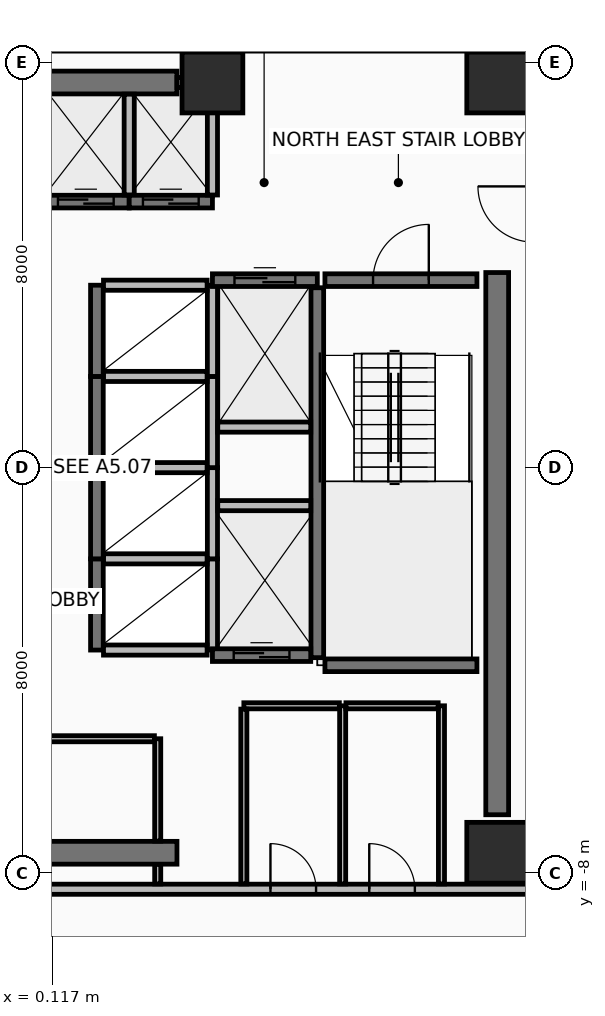
"""IFC4 building model, lengths in metres.
Left out: names, types, materials, properties, quantities, classifications, styles, units other than length and angle.
Written with IfcOpenShell. Run it as: python <this file> out.ifc"""

import sys

from ifc_helpers import new_model, si_unit, direction, frame, frame_2d, origin, origin_2d, place, context, subcontext, project, spatial, rectangle, extrude, element, fill, save


model = new_model("IFC4")
c1 = context("Model", 3, precision=1e-05, world=origin(), true_north=direction((0.0, 1.0)))
c2 = subcontext(c1, "Body", "Model", "MODEL_VIEW")
j1 = project(units=[si_unit("LENGTHUNIT", "METRE"), si_unit("PLANEANGLEUNIT", "RADIAN")], contexts=[c1])
p1 = place(None, origin())
s1 = spatial("IfcSite", under=j1, at=p1, CompositionType="ELEMENT")
p2 = place(p1, origin())
s2 = spatial("IfcBuilding", under=s1, at=p2, CompositionType="ELEMENT")
p3 = place(p2, frame((0.0, 0.0, 116.05)))
s3 = spatial("IfcBuildingStorey", under=s2, at=p3, CompositionType="ELEMENT", Elevation=116.05)
for number, where, z_axis, x_axis in (
    (1, (8.9, -7.6, 0.0), (0.0, 0.0, 1.0), (1.0, 0.0, 0.0)),
    (2, (8.9, 7.6, 0.0), (0.0, 0.0, 1.0), (1.0, 0.0, 0.0)),
    (3, (3.28, 7.6, 0.0), (0.0, 0.0, 1.0), (1.0, 0.0, 0.0)),
):
    element("IfcColumn", number, at=place(p3, frame(where, z_axis=z_axis, x_axis=x_axis)), inside=s3, PredefinedType="COLUMN", context=c2, shape_type="SweptSolid", body=[
        extrude(rectangle(XDim=1.2, YDim=1.2, at=origin_2d()), origin(), (0.0, 0.0, 1.0), 3.6),
    ])
for number, where, z_axis, x_axis in (
    (4, (-2.8, -7.6, 0.0), (0.0, 0.0, 1.0), (1.0, 0.0, 0.0)),
    (5, (-2.8, 7.6, 0.0), (0.0, 0.0, 1.0), (1.0, 0.0, 0.0)),
):
    element("IfcWall", number, at=place(p3, frame(where, z_axis=z_axis, x_axis=x_axis)), inside=s3, PredefinedType="SHEAR", context=c2, shape_type="SweptSolid", body=[
        extrude(rectangle(XDim=5.38, YDim=0.45, at=frame_2d((2.69, 0.0))), origin(), (0.0, 0.0, 1.0), 3.41),
    ])
p4 = place(p3, frame((8.9, -6.85, 0.0), z_axis=(0.0, 0.0, 1.0), x_axis=(0.0, 1.0, 0.0)))
e6 = element("IfcWall", 6, at=p4, inside=s3, PredefinedType="SHEAR", context=c2, shape_type="SweptSolid", body=[
    extrude(rectangle(XDim=10.7, YDim=0.45, at=frame_2d((5.35, 0.0))), origin(), (0.0, 0.0, 1.0), 3.41),
])
p5 = place(p3, frame((-9.62, -8.32, 0.0), z_axis=(0.0, 0.0, 1.0), x_axis=(1.0, 0.0, 0.0)))
e7 = element("IfcWall", 7, at=p5, inside=s3, PredefinedType="PARTITIONING", context=c2, shape_type="SweptSolid", body=[
    extrude(rectangle(XDim=19.24, YDim=0.2, at=frame_2d((9.62, 0.0))), origin(), (0.0, 0.0, 1.0), 2.855),
])
p6 = place(p5, frame((8.57, 0.0, 0.0)))
e8 = element("IfcOpeningElement", 8, at=p6, cuts=e7, PredefinedType="OPENING", context=c2, shape_type="SweptSolid", body=[
    extrude(rectangle(XDim=0.9, YDim=2.1, at=frame_2d((0.45, 1.05))), frame((0.0, 0.11, 0.0), z_axis=(0.0, -1.0, 0.0), x_axis=(1.0, 0.0, 0.0)), (0.0, 0.0, 1.0), 0.22),
])
p7 = place(p5, frame((14.045, 0.0, 0.0)))
e9 = element("IfcOpeningElement", 9, at=p7, cuts=e7, PredefinedType="OPENING", context=c2, shape_type="SweptSolid", body=[
    extrude(rectangle(XDim=0.9, YDim=2.1, at=frame_2d((0.45, 1.05))), frame((0.0, 0.11, 0.0), z_axis=(0.0, -1.0, 0.0), x_axis=(1.0, 0.0, 0.0)), (0.0, 0.0, 1.0), 0.22),
])
p8 = place(p5, frame((15.995, 0.0, 0.0)))
e10 = element("IfcOpeningElement", 10, at=p8, cuts=e7, PredefinedType="OPENING", context=c2, shape_type="SweptSolid", body=[
    extrude(rectangle(XDim=0.9, YDim=2.1, at=frame_2d((0.45, 1.05))), frame((0.0, 0.11, 0.0), z_axis=(0.0, -1.0, 0.0), x_axis=(1.0, 0.0, 0.0)), (0.0, 0.0, 1.0), 0.22),
])
p9 = place(p3, frame((5.35, -3.75, 0.0), z_axis=(0.0, 0.0, 1.0), x_axis=(0.0, 1.0, 0.0)))
e11 = element("IfcWall", 11, at=p9, inside=s3, PredefinedType="SHEAR", context=c2, shape_type="SweptSolid", body=[
    extrude(rectangle(XDim=7.3, YDim=0.25, at=frame_2d((3.65, 0.0))), origin(), (0.0, 0.0, 1.0), 3.41),
])
p10 = place(p3, frame((5.5, 3.7, 0.0), z_axis=(0.0, 0.0, 1.0), x_axis=(1.0, 0.0, 0.0)))
e12 = element("IfcWall", 12, at=p10, inside=s3, PredefinedType="SHEAR", context=c2, shape_type="SweptSolid", body=[
    extrude(rectangle(XDim=3.0, YDim=0.25, at=frame_2d((1.5, 0.0))), origin(), (0.0, 0.0, 1.0), 3.41),
])
p11 = place(p10, frame((0.95, 0.0, 0.0)))
e13 = element("IfcOpeningElement", 13, at=p11, cuts=e12, PredefinedType="OPENING", context=c2, shape_type="SweptSolid", body=[
    extrude(rectangle(XDim=1.1, YDim=2.15, at=frame_2d((0.55, 1.075))), frame((0.0, 0.135, 0.0), z_axis=(0.0, -1.0, 0.0), x_axis=(1.0, 0.0, 0.0)), (0.0, 0.0, 1.0), 0.27),
])
p12 = place(p3, frame((5.5, -3.9, 0.0), z_axis=(0.0, 0.0, 1.0), x_axis=(1.0, 0.0, 0.0)))
e14 = element("IfcWall", 14, at=p12, inside=s3, PredefinedType="SHEAR", context=c2, shape_type="SweptSolid", body=[
    extrude(rectangle(XDim=3.0, YDim=0.25, at=frame_2d((1.5, 0.0))), origin(), (0.0, 0.0, 1.0), 3.41),
])
p13 = place(p3, frame((-0.075, 5.25, 0.0), z_axis=(0.0, 0.0, 1.0), x_axis=(1.0, 0.0, 0.0)))
e15 = element("IfcWall", 15, at=p13, inside=s3, PredefinedType="SHEAR", context=c2, shape_type="SweptSolid", body=[
    extrude(rectangle(XDim=1.712, YDim=0.25, at=frame_2d((0.856, 0.0))), origin(), (0.0, 0.0, 1.0), 3.41),
])
p14 = place(p13, frame((0.306, 0.0, 0.0)))
e16 = element("IfcOpeningElement", 16, at=p14, cuts=e15, PredefinedType="OPENING", context=c2, shape_type="SweptSolid", body=[
    extrude(rectangle(XDim=1.1, YDim=2.2, at=frame_2d((0.55, 1.1))), frame((0.0, 0.135, 0.0), z_axis=(0.0, -1.0, 0.0), x_axis=(1.0, 0.0, 0.0)), (0.0, 0.0, 1.0), 0.27),
])
p15 = place(p3, frame((1.637, 5.38, 0.0), z_axis=(0.0, 0.0, 1.0), x_axis=(0.0, 1.0, 0.0)))
e17 = element("IfcWall", 17, at=p15, inside=s3, PredefinedType="PARTITIONING", context=c2, shape_type="SweptSolid", body=[
    extrude(rectangle(XDim=1.99, YDim=0.2, at=frame_2d((0.995, 0.0))), origin(), (0.0, 0.0, 1.0), 2.605),
])
p16 = place(p3, frame((1.637, 5.25, 0.0), z_axis=(0.0, 0.0, 1.0), x_axis=(1.0, 0.0, 0.0)))
e18 = element("IfcWall", 18, at=p16, inside=s3, PredefinedType="SHEAR", context=c2, shape_type="SweptSolid", body=[
    extrude(rectangle(XDim=1.643, YDim=0.25, at=frame_2d((0.821, 0.0))), origin(), (0.0, 0.0, 1.0), 3.41),
])
p17 = place(p16, frame((0.271, 0.0, 0.0)))
e19 = element("IfcOpeningElement", 19, at=p17, cuts=e18, PredefinedType="OPENING", context=c2, shape_type="SweptSolid", body=[
    extrude(rectangle(XDim=1.1, YDim=2.2, at=frame_2d((0.55, 1.1))), frame((0.0, 0.135, 0.0), z_axis=(0.0, -1.0, 0.0), x_axis=(1.0, 0.0, 0.0)), (0.0, 0.0, 1.0), 0.27),
])
p18 = place(p3, frame((2.58, 7.6, 0.0), z_axis=(0.0, 0.0, 1.0), x_axis=(1.0, 0.0, 0.0)))
e20 = element("IfcWall", 20, at=p18, inside=s3, PredefinedType="PARTITIONING", context=c2, shape_type="SweptSolid", body=[
    extrude(rectangle(XDim=0.7, YDim=0.2, at=frame_2d((0.35, 0.0))), origin(), (0.0, 0.0, 1.0), 2.605),
])
p19 = place(p3, frame((3.28, 5.38, 0.0), z_axis=(0.0, 0.0, 1.0), x_axis=(0.0, 1.0, 0.0)))
e21 = element("IfcWall", 21, at=p19, inside=s3, PredefinedType="PARTITIONING", context=c2, shape_type="SweptSolid", body=[
    extrude(rectangle(XDim=2.115, YDim=0.2, at=frame_2d((1.058, 0.0))), origin(), (0.0, 0.0, 1.0), 2.605),
])
p20 = place(p3, frame((1.0, -3.6, 0.0), z_axis=(0.0, 0.0, 1.0), x_axis=(0.0, 1.0, 0.0)))
e22 = element("IfcWall", 22, at=p20, inside=s3, PredefinedType="SHEAR", context=c2, shape_type="SweptSolid", body=[
    extrude(rectangle(XDim=1.8, YDim=0.25, at=frame_2d((0.9, 0.0))), origin(), (0.0, 0.0, 1.0), 3.41),
])
p21 = place(p3, frame((3.28, -3.6, 0.0), z_axis=(0.0, 0.0, 1.0), x_axis=(0.0, 1.0, 0.0)))
e23 = element("IfcWall", 23, at=p21, inside=s3, PredefinedType="PARTITIONING", context=c2, shape_type="SweptSolid", body=[
    extrude(rectangle(XDim=1.8, YDim=0.2, at=frame_2d((0.9, 0.0))), origin(), (0.0, 0.0, 1.0), 3.41),
])
for number, where, z_axis, x_axis in (
    (24, (1.13, -3.6, 0.0), (0.0, 0.0, 1.0), (1.0, 0.0, 0.0)),
    (25, (1.13, -1.8, 0.0), (0.0, 0.0, 1.0), (1.0, 0.0, 0.0)),
):
    element("IfcWall", number, at=place(p3, frame(where, z_axis=z_axis, x_axis=x_axis)), inside=s3, PredefinedType="PARTITIONING", context=c2, shape_type="SweptSolid", body=[
        extrude(rectangle(XDim=2.045, YDim=0.2, at=frame_2d((1.022, 0.0))), origin(), (0.0, 0.0, 1.0), 3.41),
    ])
p22 = place(p3, frame((1.0, -1.8, 0.0), z_axis=(0.0, 0.0, 1.0), x_axis=(0.0, 1.0, 0.0)))
e26 = element("IfcWall", 26, at=p22, inside=s3, PredefinedType="SHEAR", context=c2, shape_type="SweptSolid", body=[
    extrude(rectangle(XDim=1.8, YDim=0.25, at=frame_2d((0.9, 0.0))), origin(), (0.0, 0.0, 1.0), 3.41),
])
p23 = place(p3, frame((3.28, -1.8, 0.0), z_axis=(0.0, 0.0, 1.0), x_axis=(0.0, 1.0, 0.0)))
e27 = element("IfcWall", 27, at=p23, inside=s3, PredefinedType="PARTITIONING", context=c2, shape_type="SweptSolid", body=[
    extrude(rectangle(XDim=1.8, YDim=0.2, at=frame_2d((0.9, 0.0))), origin(), (0.0, 0.0, 1.0), 3.41),
])
p24 = place(p3, frame((1.13, 0.0, 0.0), z_axis=(0.0, 0.0, 1.0), x_axis=(1.0, 0.0, 0.0)))
e28 = element("IfcWall", 28, at=p24, inside=s3, PredefinedType="PARTITIONING", context=c2, shape_type="SweptSolid", body=[
    extrude(rectangle(XDim=2.045, YDim=0.2, at=frame_2d((1.022, 0.0))), origin(), (0.0, 0.0, 1.0), 3.41),
])
p25 = place(p3, frame((1.0, 0.0, 0.0), z_axis=(0.0, 0.0, 1.0), x_axis=(0.0, 1.0, 0.0)))
e29 = element("IfcWall", 29, at=p25, inside=s3, PredefinedType="SHEAR", context=c2, shape_type="SweptSolid", body=[
    extrude(rectangle(XDim=1.8, YDim=0.25, at=frame_2d((0.9, 0.0))), origin(), (0.0, 0.0, 1.0), 3.41),
])
p26 = place(p3, frame((3.28, 0.0, 0.0), z_axis=(0.0, 0.0, 1.0), x_axis=(0.0, 1.0, 0.0)))
e30 = element("IfcWall", 30, at=p26, inside=s3, PredefinedType="PARTITIONING", context=c2, shape_type="SweptSolid", body=[
    extrude(rectangle(XDim=1.8, YDim=0.2, at=frame_2d((0.9, 0.0))), origin(), (0.0, 0.0, 1.0), 3.41),
])
p27 = place(p3, frame((1.13, 1.8, 0.0), z_axis=(0.0, 0.0, 1.0), x_axis=(1.0, 0.0, 0.0)))
e31 = element("IfcWall", 31, at=p27, inside=s3, PredefinedType="PARTITIONING", context=c2, shape_type="SweptSolid", body=[
    extrude(rectangle(XDim=2.045, YDim=0.2, at=frame_2d((1.022, 0.0))), origin(), (0.0, 0.0, 1.0), 3.41),
])
p28 = place(p3, frame((1.0, 1.8, 0.0), z_axis=(0.0, 0.0, 1.0), x_axis=(0.0, 1.0, 0.0)))
e32 = element("IfcWall", 32, at=p28, inside=s3, PredefinedType="SHEAR", context=c2, shape_type="SweptSolid", body=[
    extrude(rectangle(XDim=1.8, YDim=0.25, at=frame_2d((0.9, 0.0))), origin(), (0.0, 0.0, 1.0), 3.41),
])
p29 = place(p3, frame((3.28, 1.8, 0.0), z_axis=(0.0, 0.0, 1.0), x_axis=(0.0, 1.0, 0.0)))
e33 = element("IfcWall", 33, at=p29, inside=s3, PredefinedType="PARTITIONING", context=c2, shape_type="SweptSolid", body=[
    extrude(rectangle(XDim=1.8, YDim=0.2, at=frame_2d((0.9, 0.0))), origin(), (0.0, 0.0, 1.0), 3.41),
])
p30 = place(p3, frame((1.13, 3.6, 0.0), z_axis=(0.0, 0.0, 1.0), x_axis=(1.0, 0.0, 0.0)))
e34 = element("IfcWall", 34, at=p30, inside=s3, PredefinedType="PARTITIONING", context=c2, shape_type="SweptSolid", body=[
    extrude(rectangle(XDim=2.045, YDim=0.2, at=frame_2d((1.022, 0.0))), origin(), (0.0, 0.0, 1.0), 2.605),
])
p31 = place(p3, frame((3.28, 3.7, 0.0), z_axis=(0.0, 0.0, 1.0), x_axis=(1.0, 0.0, 0.0)))
e35 = element("IfcWall", 35, at=p31, inside=s3, PredefinedType="SHEAR", context=c2, shape_type="SweptSolid", body=[
    extrude(rectangle(XDim=2.07, YDim=0.25, at=frame_2d((1.035, 0.0))), origin(), (0.0, 0.0, 1.0), 3.41),
])
p32 = place(p31, frame((0.435, 0.0, 0.0)))
e36 = element("IfcOpeningElement", 36, at=p32, cuts=e35, PredefinedType="OPENING", context=c2, shape_type="SweptSolid", body=[
    extrude(rectangle(XDim=1.2, YDim=2.2, at=frame_2d((0.6, 1.1))), frame((0.0, 0.135, 0.0), z_axis=(0.0, -1.0, 0.0), x_axis=(1.0, 0.0, 0.0)), (0.0, 0.0, 1.0), 0.27),
])
p33 = place(p3, frame((3.385, 0.8, 0.0), z_axis=(0.0, 0.0, 1.0), x_axis=(1.0, 0.0, 0.0)))
e37 = element("IfcWall", 37, at=p33, inside=s3, PredefinedType="PARTITIONING", context=c2, shape_type="SweptSolid", body=[
    extrude(rectangle(XDim=1.835, YDim=0.2, at=frame_2d((0.917, 0.0))), origin(), (0.0, 0.0, 1.0), 3.41),
])
p34 = place(p3, frame((3.28, -3.7, 0.0), z_axis=(0.0, 0.0, 1.0), x_axis=(1.0, 0.0, 0.0)))
e38 = element("IfcWall", 38, at=p34, inside=s3, PredefinedType="SHEAR", context=c2, shape_type="SweptSolid", body=[
    extrude(rectangle(XDim=1.94, YDim=0.25, at=frame_2d((0.97, 0.0))), origin(), (0.0, 0.0, 1.0), 3.41),
])
p35 = place(p34, frame((0.42, 0.0, 0.0)))
e39 = element("IfcOpeningElement", 39, at=p35, cuts=e38, PredefinedType="OPENING", context=c2, shape_type="SweptSolid", body=[
    extrude(rectangle(XDim=1.1, YDim=2.2, at=frame_2d((0.55, 1.1))), frame((0.0, 0.135, 0.0), z_axis=(0.0, -1.0, 0.0), x_axis=(1.0, 0.0, 0.0)), (0.0, 0.0, 1.0), 0.27),
])
p36 = place(p3, frame((3.385, -0.75, 0.0), z_axis=(0.0, 0.0, 1.0), x_axis=(1.0, 0.0, 0.0)))
e40 = element("IfcWall", 40, at=p36, inside=s3, PredefinedType="PARTITIONING", context=c2, shape_type="SweptSolid", body=[
    extrude(rectangle(XDim=1.835, YDim=0.2, at=frame_2d((0.917, 0.0))), origin(), (0.0, 0.0, 1.0), 3.41),
])
p37 = place(p3, frame((2.2, -8.215, 0.0), z_axis=(0.0, 0.0, 1.0), x_axis=(0.0, 1.0, 0.0)))
e41 = element("IfcWall", 41, at=p37, inside=s3, PredefinedType="PARTITIONING", context=c2, shape_type="SweptSolid", body=[
    extrude(rectangle(XDim=0.385, YDim=0.12, at=frame_2d((0.192, 0.0))), origin(), (0.0, 0.0, 1.0), 2.605),
])
p38 = place(p3, frame((2.2, -7.37, 0.0), z_axis=(0.0, 0.0, 1.0), x_axis=(0.0, 1.0, 0.0)))
e42 = element("IfcWall", 42, at=p38, inside=s3, PredefinedType="PARTITIONING", context=c2, shape_type="SweptSolid", body=[
    extrude(rectangle(XDim=2.02, YDim=0.12, at=frame_2d((1.01, 0.0))), origin(), (0.0, 0.0, 1.0), 2.605),
])
p39 = place(p3, frame((2.135, -5.35, 0.0), z_axis=(0.0, 0.0, 1.0), x_axis=(-1.0, 0.0, 0.0)))
e43 = element("IfcWall", 43, at=p39, inside=s3, PredefinedType="PARTITIONING", context=c2, shape_type="SweptSolid", body=[
    extrude(rectangle(XDim=5.535, YDim=0.12, at=frame_2d((2.768, 0.0))), origin(), (0.0, 0.0, 1.0), 2.605),
])
p40 = place(p3, frame((5.85, -8.215, 0.0), z_axis=(0.0, 0.0, 1.0), x_axis=(0.0, 1.0, 0.0)))
e44 = element("IfcWall", 44, at=p40, inside=s3, PredefinedType="PARTITIONING", context=c2, shape_type="SweptSolid", body=[
    extrude(rectangle(XDim=3.515, YDim=0.12, at=frame_2d((1.758, 0.0))), origin(), (0.0, 0.0, 1.0), 2.605),
])
p41 = place(p3, frame((5.785, -4.7, 0.0), z_axis=(0.0, 0.0, 1.0), x_axis=(-1.0, 0.0, 0.0)))
e45 = element("IfcWall", 45, at=p41, inside=s3, PredefinedType="PARTITIONING", context=c2, shape_type="SweptSolid", body=[
    extrude(rectangle(XDim=1.885, YDim=0.12, at=frame_2d((0.942, 0.0))), origin(), (0.0, 0.0, 1.0), 3.41),
])
p42 = place(p3, frame((3.9, -4.765, 0.0), z_axis=(0.0, 0.0, 1.0), x_axis=(0.0, -1.0, 0.0)))
e46 = element("IfcWall", 46, at=p42, inside=s3, PredefinedType="PARTITIONING", context=c2, shape_type="SweptSolid", body=[
    extrude(rectangle(XDim=3.45, YDim=0.12, at=frame_2d((1.725, 0.0))), origin(), (0.0, 0.0, 1.0), 2.605),
])
p43 = place(p3, frame((7.8, -8.215, 0.0), z_axis=(0.0, 0.0, 1.0), x_axis=(0.0, 1.0, 0.0)))
e47 = element("IfcWall", 47, at=p43, inside=s3, PredefinedType="PARTITIONING", context=c2, shape_type="SweptSolid", body=[
    extrude(rectangle(XDim=3.515, YDim=0.12, at=frame_2d((1.758, 0.0))), origin(), (0.0, 0.0, 1.0), 2.605),
])
p44 = place(p3, frame((7.735, -4.7, 0.0), z_axis=(0.0, 0.0, 1.0), x_axis=(-1.0, 0.0, 0.0)))
e48 = element("IfcWall", 48, at=p44, inside=s3, PredefinedType="PARTITIONING", context=c2, shape_type="SweptSolid", body=[
    extrude(rectangle(XDim=1.82, YDim=0.12, at=frame_2d((0.91, 0.0))), origin(), (0.0, 0.0, 1.0), 3.41),
])
p45 = place(p11, frame((1.1, 0.0, 0.0), z_axis=(0.0, 0.0, 1.0), x_axis=(-1.0, 0.0, 0.0)))
e49 = element("IfcDoor", 49, at=p45, inside=s3, OperationType="SINGLE_SWING_LEFT", PredefinedType="DOOR", context=c2, shape_type="SweptSolid", body=[
    extrude(rectangle(XDim=1.1, YDim=2.15, at=frame_2d((0.55, 1.075))), frame((0.0, 0.025, 0.0), z_axis=(0.0, -1.0, 0.0), x_axis=(1.0, 0.0, 0.0)), (0.0, 0.0, 1.0), 0.05),
])
fill(e13, e49)
p46 = place(p14, origin())
e50 = element("IfcDoor", 50, at=p46, inside=s3, OperationType="SLIDING_TO_LEFT", PredefinedType="DOOR", context=c2, shape_type="SweptSolid", body=[
    extrude(rectangle(XDim=1.1, YDim=2.2, at=frame_2d((0.55, 1.1))), frame((0.0, 0.025, 0.0), z_axis=(0.0, -1.0, 0.0), x_axis=(1.0, 0.0, 0.0)), (0.0, 0.0, 1.0), 0.05),
])
fill(e16, e50)
p47 = place(p17, origin())
e51 = element("IfcDoor", 51, at=p47, inside=s3, OperationType="SLIDING_TO_LEFT", PredefinedType="DOOR", context=c2, shape_type="SweptSolid", body=[
    extrude(rectangle(XDim=1.1, YDim=2.2, at=frame_2d((0.55, 1.1))), frame((0.0, 0.025, 0.0), z_axis=(0.0, -1.0, 0.0), x_axis=(1.0, 0.0, 0.0)), (0.0, 0.0, 1.0), 0.05),
])
fill(e19, e51)
p48 = place(p32, origin())
e52 = element("IfcDoor", 52, at=p48, inside=s3, OperationType="SLIDING_TO_RIGHT", PredefinedType="DOOR", context=c2, shape_type="SweptSolid", body=[
    extrude(rectangle(XDim=1.2, YDim=2.2, at=frame_2d((0.6, 1.1))), frame((0.0, 0.025, 0.0), z_axis=(0.0, -1.0, 0.0), x_axis=(1.0, 0.0, 0.0)), (0.0, 0.0, 1.0), 0.05),
])
fill(e36, e52)
p49 = place(p35, origin())
e53 = element("IfcDoor", 53, at=p49, inside=s3, OperationType="SLIDING_TO_LEFT", PredefinedType="DOOR", context=c2, shape_type="SweptSolid", body=[
    extrude(rectangle(XDim=1.1, YDim=2.2, at=frame_2d((0.55, 1.1))), frame((0.0, 0.025, 0.0), z_axis=(0.0, -1.0, 0.0), x_axis=(1.0, 0.0, 0.0)), (0.0, 0.0, 1.0), 0.05),
])
fill(e39, e53)
p50 = place(p7, origin())
e54 = element("IfcDoor", 54, at=p50, inside=s3, OperationType="SINGLE_SWING_LEFT", PredefinedType="DOOR", context=c2, shape_type="SweptSolid", body=[
    extrude(rectangle(XDim=0.9, YDim=2.1, at=frame_2d((0.45, 1.05))), frame((0.0, 0.025, 0.0), z_axis=(0.0, -1.0, 0.0), x_axis=(1.0, 0.0, 0.0)), (0.0, 0.0, 1.0), 0.05),
])
fill(e9, e54)
p51 = place(p8, origin())
e55 = element("IfcDoor", 55, at=p51, inside=s3, OperationType="SINGLE_SWING_LEFT", PredefinedType="DOOR", context=c2, shape_type="SweptSolid", body=[
    extrude(rectangle(XDim=0.9, YDim=2.1, at=frame_2d((0.45, 1.05))), frame((0.0, 0.025, 0.0), z_axis=(0.0, -1.0, 0.0), x_axis=(1.0, 0.0, 0.0)), (0.0, 0.0, 1.0), 0.05),
])
fill(e10, e55)
save(model, sys.argv[1])
